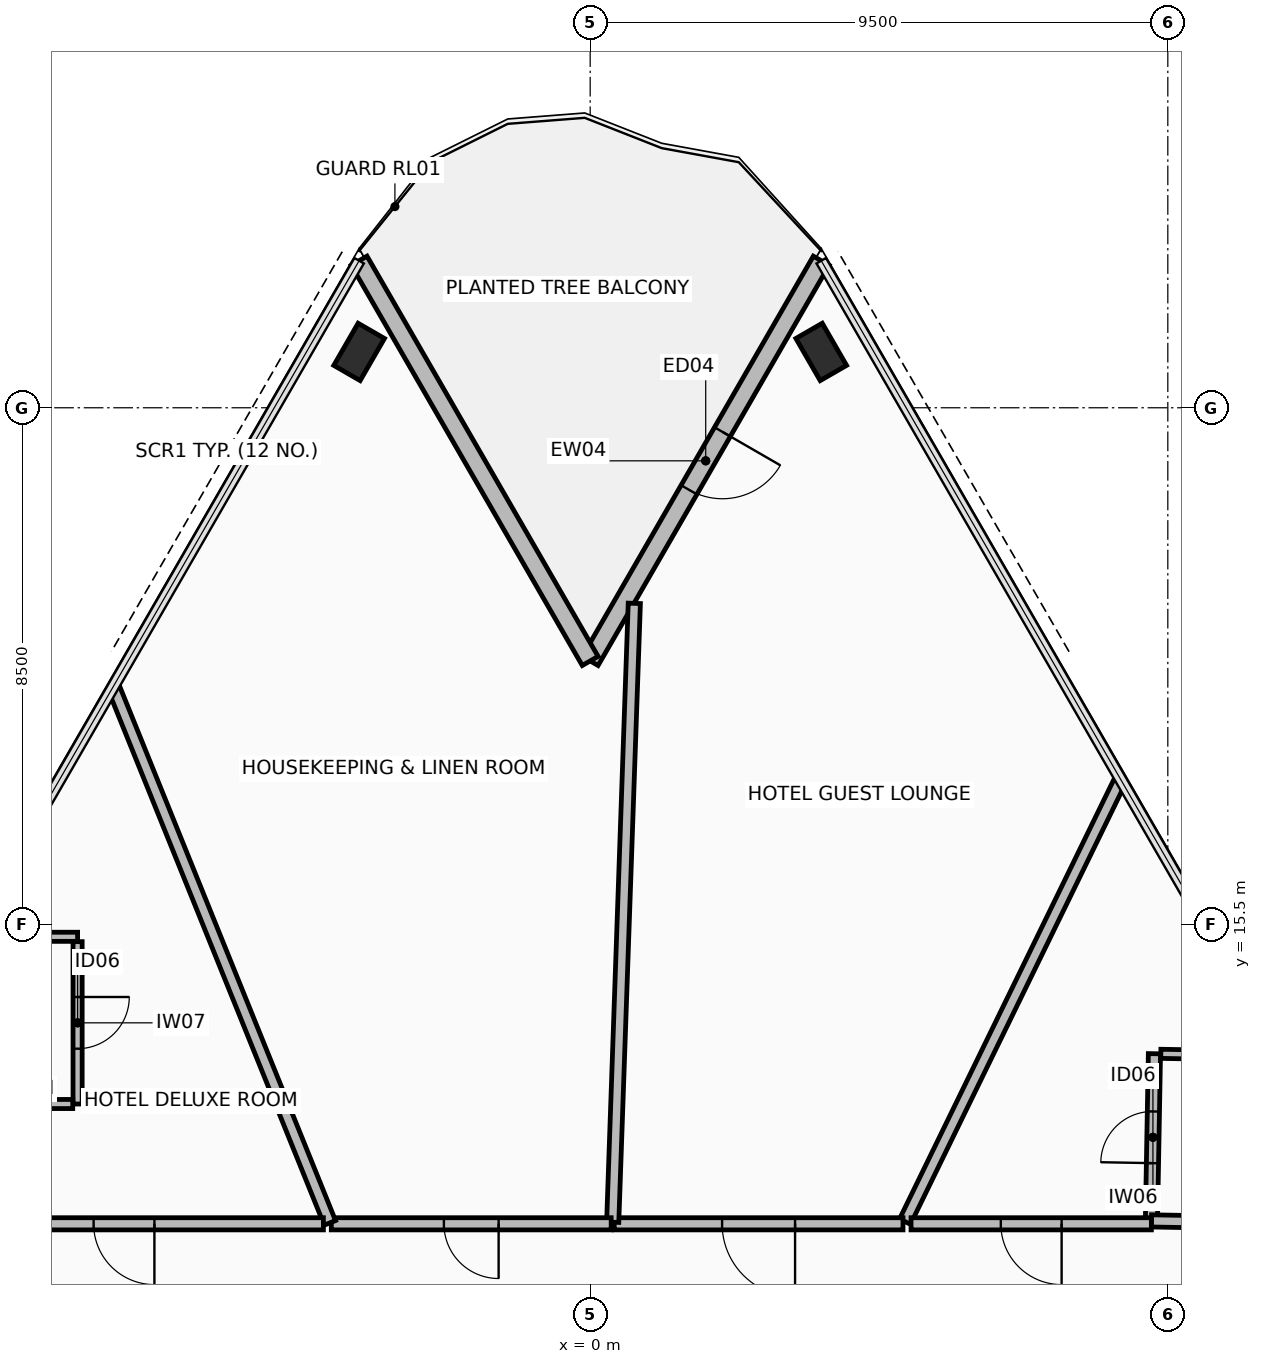
"""IFC4 building model, lengths in metres.
Left out: names, types, materials, properties, quantities, classifications, styles, units other than length and angle.
Written with IfcOpenShell. Run it as: python <this file> out.ifc"""

import sys

from ifc_helpers import new_model, si_unit, direction, frame, frame_2d, origin, origin_2d, place, context, subcontext, project, spatial, rectangle, hollow_rectangle, extrude, element, fill, save


model = new_model("IFC4")
c1 = context("Model", 3, precision=1e-05, world=origin(), true_north=direction((0.0, 1.0)))
c2 = subcontext(c1, "Body", "Model", "MODEL_VIEW")
j1 = project(units=[si_unit("LENGTHUNIT", "METRE"), si_unit("PLANEANGLEUNIT", "RADIAN")], contexts=[c1])
p1 = place(None, origin())
s1 = spatial("IfcSite", under=j1, at=p1, CompositionType="ELEMENT")
p2 = place(p1, origin())
s2 = spatial("IfcBuilding", under=s1, at=p2, CompositionType="ELEMENT")
p3 = place(p2, frame((0.0, 0.0, 45.45)))
s3 = spatial("IfcBuildingStorey", under=s2, at=p3, CompositionType="ELEMENT", Elevation=45.45)
for number, where, z_axis, x_axis in (
    (1, (-3.8, 24.918, 0.0), (0.0, 0.0, 1.0), (0.5, 0.866, 0.0)),
    (2, (3.8, 24.918, 0.0), (0.0, 0.0, 1.0), (-0.5, 0.866, 0.0)),
):
    element("IfcColumn", number, at=place(p3, frame(where, z_axis=z_axis, x_axis=x_axis)), inside=s3, PredefinedType="COLUMN", context=c2, shape_type="SweptSolid", body=[
        extrude(hollow_rectangle(XDim=0.5, YDim=0.8, WallThickness=0.04, at=origin_2d()), origin(), (0.0, 0.0, 1.0), 3.4),
    ])
p4 = place(p3, frame((3.8, 26.418, 0.0), z_axis=(0.0, 0.0, 1.0), x_axis=(-0.500005158081, -0.866022425744, 0.0)))
e3 = element("IfcWall", 3, at=p4, inside=s3, PredefinedType="STANDARD", context=c2, shape_type="SweptSolid", body=[
    extrude(rectangle(XDim=7.6, YDim=0.3, at=frame_2d((3.8, 0.0))), origin(), (0.0, 0.0, 1.0), 2.42),
])
p5 = place(p4, frame((3.25, 0.0, 0.0)))
e4 = element("IfcOpeningElement", 4, at=p5, cuts=e3, PredefinedType="OPENING", context=c2, shape_type="SweptSolid", body=[
    extrude(rectangle(XDim=1.1, YDim=2.2, at=frame_2d((0.55, 1.1))), frame((0.0, 0.16, 0.0), z_axis=(0.0, -1.0, 0.0), x_axis=(1.0, 0.0, 0.0)), (0.0, 0.0, 1.0), 0.32),
])
p6 = place(p3, frame((0.0, 19.836, 0.0), z_axis=(0.0, 0.0, 1.0), x_axis=(-0.500005158081, 0.866022425744, 0.0)))
e5 = element("IfcWall", 5, at=p6, inside=s3, PredefinedType="STANDARD", context=c2, shape_type="SweptSolid", body=[
    extrude(rectangle(XDim=7.6, YDim=0.3, at=frame_2d((3.8, 0.0))), origin(), (0.0, 0.0, 1.0), 2.42),
])
p7 = place(p3, frame((9.23, 10.628, 0.0), z_axis=(0.0, 0.0, 1.0), x_axis=(0.017933538856, 0.999839181161, 0.0)))
e6 = element("IfcWall", 6, at=p7, inside=s3, PredefinedType="PARTITIONING", context=c2, shape_type="SweptSolid", body=[
    extrude(rectangle(XDim=2.75, YDim=0.2, at=frame_2d((1.375, 0.0))), origin(), (0.0, 0.0, 1.0), 2.82),
])
p8 = place(p7, frame((0.95, 0.0, 0.0)))
e7 = element("IfcOpeningElement", 7, at=p8, cuts=e6, PredefinedType="OPENING", context=c2, shape_type="SweptSolid", body=[
    extrude(rectangle(XDim=0.85, YDim=2.1, at=frame_2d((0.425, 1.05))), frame((0.0, 0.11, 0.0), z_axis=(0.0, -1.0, 0.0), x_axis=(1.0, 0.0, 0.0)), (0.0, 0.0, 1.0), 0.22),
])
p9 = place(p3, frame((9.385, 13.375, 0.0), z_axis=(0.0, 0.0, 1.0), x_axis=(0.999837856061, -0.018007264828, 0.0)))
e8 = element("IfcWall", 8, at=p9, inside=s3, PredefinedType="PARTITIONING", context=c2, shape_type="SweptSolid", body=[
    extrude(rectangle(XDim=1.966, YDim=0.15, at=frame_2d((0.983, 0.0))), origin(), (0.0, 0.0, 1.0), 2.42),
])
p10 = place(p3, frame((12.955, 10.561, 0.0), z_axis=(0.0, 0.0, 1.0), x_axis=(-0.99983759803, 0.018021586122, 0.0)))
e9 = element("IfcWall", 9, at=p10, inside=s3, PredefinedType="PARTITIONING", context=c2, shape_type="SweptSolid", body=[
    extrude(rectangle(XDim=3.725, YDim=0.2, at=frame_2d((1.863, 0.0))), origin(), (0.0, 0.0, 1.0), 2.42),
])
p11 = place(p3, frame((-10.219, 15.3, 0.0), z_axis=(0.0, 0.0, 1.0), x_axis=(1.0, 0.0, 0.0)))
e10 = element("IfcWall", 10, at=p11, inside=s3, PredefinedType="PARTITIONING", context=c2, shape_type="SweptSolid", body=[
    extrude(rectangle(XDim=1.789, YDim=0.15, at=frame_2d((0.895, 0.0))), origin(), (0.0, 0.0, 1.0), 2.42),
])
p12 = place(p3, frame((-8.43, 15.22, 0.0), z_axis=(0.0, 0.0, 1.0), x_axis=(0.0, -1.0, 0.0)))
e11 = element("IfcWall", 11, at=p12, inside=s3, PredefinedType="PARTITIONING", context=c2, shape_type="SweptSolid", body=[
    extrude(rectangle(XDim=2.67, YDim=0.15, at=frame_2d((1.335, 0.0))), origin(), (0.0, 0.0, 1.0), 3.225),
])
p13 = place(p12, frame((0.91, 0.0, 0.0)))
e12 = element("IfcOpeningElement", 12, at=p13, cuts=e11, PredefinedType="OPENING", context=c2, shape_type="SweptSolid", body=[
    extrude(rectangle(XDim=0.85, YDim=2.1, at=frame_2d((0.425, 1.05))), frame((0.0, 0.085, 0.0), z_axis=(0.0, -1.0, 0.0), x_axis=(1.0, 0.0, 0.0)), (0.0, 0.0, 1.0), 0.17),
])
p14 = place(p3, frame((-8.51, 12.55, 0.0), z_axis=(0.0, 0.0, 1.0), x_axis=(-1.0, 0.0, 0.0)))
e13 = element("IfcWall", 13, at=p14, inside=s3, PredefinedType="PARTITIONING", context=c2, shape_type="SweptSolid", body=[
    extrude(rectangle(XDim=2.49, YDim=0.15, at=frame_2d((1.245, 0.0))), origin(), (0.0, 0.0, 1.0), 2.42),
])
p15 = place(p3, frame((5.178, 10.616, 0.0), z_axis=(0.0, 0.0, 1.0), x_axis=(0.438357049566, 0.898800921838, 0.0)))
e14 = element("IfcWall", 14, at=p15, inside=s3, PredefinedType="PARTITIONING", context=c2, shape_type="SweptSolid", body=[
    extrude(rectangle(XDim=8.091, YDim=0.2, at=frame_2d((4.046, 0.0))), origin(), (0.0, 0.0, 1.0), 2.42),
])
p16 = place(p3, frame((9.229, 10.58, 0.0), z_axis=(0.0, 0.0, 1.0), x_axis=(-1.0, 0.0, 0.0)))
e15 = element("IfcWall", 15, at=p16, inside=s3, PredefinedType="PARTITIONING", context=c2, shape_type="SweptSolid", body=[
    extrude(rectangle(XDim=3.952, YDim=0.2, at=frame_2d((1.976, 0.0))), origin(), (0.0, 0.0, 1.0), 2.82),
])
p17 = place(p16, frame((1.476, 0.0, 0.0)))
e16 = element("IfcOpeningElement", 16, at=p17, cuts=e15, PredefinedType="OPENING", context=c2, shape_type="SweptSolid", body=[
    extrude(rectangle(XDim=1.0, YDim=2.15, at=frame_2d((0.5, 1.075))), frame((0.0, 0.11, 0.0), z_axis=(0.0, -1.0, 0.0), x_axis=(1.0, 0.0, 0.0)), (0.0, 0.0, 1.0), 0.22),
])
p18 = place(p3, frame((5.145, 10.58, 0.0), z_axis=(0.0, 0.0, 1.0), x_axis=(-1.0, 0.0, 0.0)))
e17 = element("IfcWall", 17, at=p18, inside=s3, PredefinedType="PARTITIONING", context=c2, shape_type="SweptSolid", body=[
    extrude(rectangle(XDim=4.749, YDim=0.2, at=frame_2d((2.375, 0.0))), origin(), (0.0, 0.0, 1.0), 2.57),
])
p19 = place(p18, frame((1.775, 0.0, 0.0)))
e18 = element("IfcOpeningElement", 18, at=p19, cuts=e17, PredefinedType="OPENING", context=c2, shape_type="SweptSolid", body=[
    extrude(rectangle(XDim=1.2, YDim=2.15, at=frame_2d((0.6, 1.075))), frame((0.0, 0.11, 0.0), z_axis=(0.0, -1.0, 0.0), x_axis=(1.0, 0.0, 0.0)), (0.0, 0.0, 1.0), 0.22),
])
p20 = place(p3, frame((0.37, 10.606, 0.0), z_axis=(0.0, 0.0, 1.0), x_axis=(0.034905671556, 0.999390611369, 0.0)))
e19 = element("IfcWall", 19, at=p20, inside=s3, PredefinedType="PARTITIONING", context=c2, shape_type="SweptSolid", body=[
    extrude(rectangle(XDim=10.184, YDim=0.2, at=frame_2d((5.092, 0.0))), origin(), (0.0, 0.0, 1.0), 2.57),
])
p21 = place(p3, frame((0.345, 10.58, 0.0), z_axis=(0.0, 0.0, 1.0), x_axis=(-1.0, 0.0, 0.0)))
e20 = element("IfcWall", 20, at=p21, inside=s3, PredefinedType="PARTITIONING", context=c2, shape_type="SweptSolid", body=[
    extrude(rectangle(XDim=4.603, YDim=0.2, at=frame_2d((2.302, 0.0))), origin(), (0.0, 0.0, 1.0), 3.225),
])
p22 = place(p21, frame((1.851, 0.0, 0.0)))
e21 = element("IfcOpeningElement", 21, at=p22, cuts=e20, PredefinedType="OPENING", context=c2, shape_type="SweptSolid", body=[
    extrude(rectangle(XDim=0.9, YDim=2.1, at=frame_2d((0.45, 1.05))), frame((0.0, 0.11, 0.0), z_axis=(0.0, -1.0, 0.0), x_axis=(1.0, 0.0, 0.0)), (0.0, 0.0, 1.0), 0.22),
])
p23 = place(p3, frame((-4.281, 10.596, 0.0), z_axis=(0.0, 0.0, 1.0), x_axis=(-0.374587987238, 0.927191371733, 0.0)))
e22 = element("IfcWall", 22, at=p23, inside=s3, PredefinedType="PARTITIONING", context=c2, shape_type="SweptSolid", body=[
    extrude(rectangle(XDim=9.499, YDim=0.2, at=frame_2d((4.75, 0.0))), origin(), (0.0, 0.0, 1.0), 2.42),
])
p24 = place(p3, frame((-4.388, 10.58, 0.0), z_axis=(0.0, 0.0, 1.0), x_axis=(-1.0, 0.0, 0.0)))
e23 = element("IfcWall", 23, at=p24, inside=s3, PredefinedType="PARTITIONING", context=c2, shape_type="SweptSolid", body=[
    extrude(rectangle(XDim=6.558, YDim=0.2, at=frame_2d((3.279, 0.0))), origin(), (0.0, 0.0, 1.0), 2.62),
])
p25 = place(p24, frame((2.779, 0.0, 0.0)))
e24 = element("IfcOpeningElement", 24, at=p25, cuts=e23, PredefinedType="OPENING", context=c2, shape_type="SweptSolid", body=[
    extrude(rectangle(XDim=1.0, YDim=2.15, at=frame_2d((0.5, 1.075))), frame((0.0, 0.11, 0.0), z_axis=(0.0, -1.0, 0.0), x_axis=(1.0, 0.0, 0.0)), (0.0, 0.0, 1.0), 0.22),
])
p26 = place(p5, origin())
e25 = element("IfcDoor", 25, at=p26, inside=s3, OperationType="SINGLE_SWING_LEFT", PredefinedType="DOOR", context=c2, shape_type="SweptSolid", body=[
    extrude(rectangle(XDim=1.1, YDim=2.2, at=frame_2d((0.55, 1.1))), frame((0.0, 0.025, 0.0), z_axis=(0.0, -1.0, 0.0), x_axis=(1.0, 0.0, 0.0)), (0.0, 0.0, 1.0), 0.05),
])
fill(e4, e25)
p27 = place(p8, origin())
e26 = element("IfcDoor", 26, at=p27, inside=s3, OperationType="SINGLE_SWING_RIGHT", PredefinedType="DOOR", context=c2, shape_type="SweptSolid", body=[
    extrude(rectangle(XDim=0.85, YDim=2.1, at=frame_2d((0.425, 1.05))), frame((0.0, 0.025, 0.0), z_axis=(0.0, -1.0, 0.0), x_axis=(1.0, 0.0, 0.0)), (0.0, 0.0, 1.0), 0.05),
])
fill(e7, e26)
p28 = place(p13, origin())
e27 = element("IfcDoor", 27, at=p28, inside=s3, OperationType="SINGLE_SWING_RIGHT", PredefinedType="DOOR", context=c2, shape_type="SweptSolid", body=[
    extrude(rectangle(XDim=0.85, YDim=2.1, at=frame_2d((0.425, 1.05))), frame((0.0, 0.025, 0.0), z_axis=(0.0, -1.0, 0.0), x_axis=(1.0, 0.0, 0.0)), (0.0, 0.0, 1.0), 0.05),
])
fill(e12, e27)
p29 = place(p17, origin())
e28 = element("IfcDoor", 28, at=p29, inside=s3, OperationType="SINGLE_SWING_LEFT", PredefinedType="DOOR", context=c2, shape_type="SweptSolid", body=[
    extrude(rectangle(XDim=1.0, YDim=2.15, at=frame_2d((0.5, 1.075))), frame((0.0, 0.025, 0.0), z_axis=(0.0, -1.0, 0.0), x_axis=(1.0, 0.0, 0.0)), (0.0, 0.0, 1.0), 0.05),
])
fill(e16, e28)
p30 = place(p19, origin())
e29 = element("IfcDoor", 29, at=p30, inside=s3, OperationType="SINGLE_SWING_LEFT", PredefinedType="DOOR", context=c2, shape_type="SweptSolid", body=[
    extrude(rectangle(XDim=1.2, YDim=2.15, at=frame_2d((0.6, 1.075))), frame((0.0, 0.025, 0.0), z_axis=(0.0, -1.0, 0.0), x_axis=(1.0, 0.0, 0.0)), (0.0, 0.0, 1.0), 0.05),
])
fill(e18, e29)
p31 = place(p22, origin())
e30 = element("IfcDoor", 30, at=p31, inside=s3, OperationType="SINGLE_SWING_LEFT", PredefinedType="DOOR", context=c2, shape_type="SweptSolid", body=[
    extrude(rectangle(XDim=0.9, YDim=2.1, at=frame_2d((0.45, 1.05))), frame((0.0, 0.025, 0.0), z_axis=(0.0, -1.0, 0.0), x_axis=(1.0, 0.0, 0.0)), (0.0, 0.0, 1.0), 0.05),
])
fill(e21, e30)
p32 = place(p25, origin())
e31 = element("IfcDoor", 31, at=p32, inside=s3, OperationType="SINGLE_SWING_LEFT", PredefinedType="DOOR", context=c2, shape_type="SweptSolid", body=[
    extrude(rectangle(XDim=1.0, YDim=2.15, at=frame_2d((0.5, 1.075))), frame((0.0, 0.025, 0.0), z_axis=(0.0, -1.0, 0.0), x_axis=(1.0, 0.0, 0.0)), (0.0, 0.0, 1.0), 0.05),
])
fill(e24, e31)
save(model, sys.argv[1])
